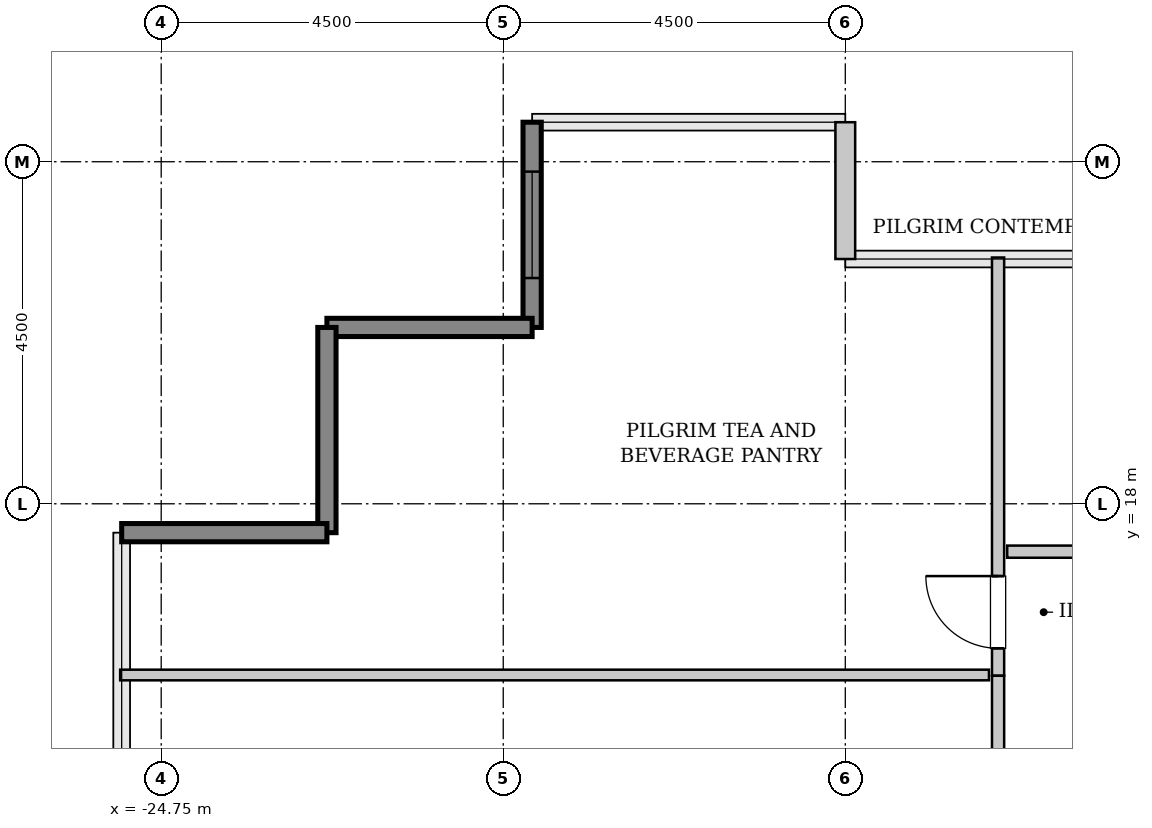
"""IFC4 building model, lengths in metres.
Left out: names, types, materials, properties, quantities, classifications, styles, units other than length and angle.
Written with IfcOpenShell. Run it as: python <this file> out.ifc"""

import sys

from ifc_helpers import new_model, si_unit, direction, frame, frame_2d, origin, place, context, subcontext, project, spatial, rectangle, extrude, source, transform, mapped, element, fill, save


model = new_model("IFC4")
c1 = context("Model", 3, precision=1e-05, world=origin(), true_north=direction((0.0, 1.0)))
c2 = subcontext(c1, "Body", "Model", "MODEL_VIEW")
j1 = project(units=[si_unit("LENGTHUNIT", "METRE"), si_unit("PLANEANGLEUNIT", "RADIAN")], contexts=[c1])
p1 = place(None, origin())
s1 = spatial("IfcSite", under=j1, at=p1, CompositionType="ELEMENT")
p2 = place(p1, origin())
s2 = spatial("IfcBuilding", under=s1, at=p2, CompositionType="ELEMENT")
p3 = place(p2, frame((0.0, 0.0, 233.2)))
s3 = spatial("IfcBuildingStorey", under=s2, at=p3, CompositionType="ELEMENT", Elevation=233.2)
m1 = source(origin(), c2, "Body", "SweptSolid", [
    extrude(rectangle(XDim=1.8, YDim=0.26, at=frame_2d((0.9, 0.0))), origin(), (0.0, 0.0, 1.0), 3.55),
])
p4 = place(p3, frame((-15.75, 21.22, 0.0), z_axis=(0.0, 0.0, 1.0), x_axis=(0.0, 1.0, 0.0)))
e1 = element("IfcWall", 1, at=p4, inside=s3, PredefinedType="SOLIDWALL", context=c2, shape_type="MappedRepresentation", body=[
    mapped(m1, transform((0.0, 0.0, 0.0), x_axis=(1.0, 0.0, 0.0), y_axis=(0.0, 1.0, 0.0), z_axis=(0.0, 0.0, 1.0), scale=1.0)),
])
m2 = source(origin(), c2, "Body", "SweptSolid", [
    extrude(rectangle(XDim=2.7, YDim=0.24, at=frame_2d((1.35, 0.0))), origin(), (0.0, 0.0, 1.0), 3.55),
])
p5 = place(p3, frame((-19.87, 23.02, 0.0), z_axis=(0.0, 0.0, 1.0), x_axis=(0.0, -1.0, 0.0)))
e2 = element("IfcWall", 2, at=p5, inside=s3, PredefinedType="SHEAR", context=c2, shape_type="MappedRepresentation", body=[
    mapped(m2, transform((0.0, 0.0, 0.0), x_axis=(1.0, 0.0, 0.0), y_axis=(0.0, 1.0, 0.0), z_axis=(0.0, 0.0, 1.0), scale=1.0)),
])
p6 = place(p5, frame((0.65, 0.0, 0.85)))
e3 = element("IfcOpeningElement", 3, at=p6, cuts=e2, PredefinedType="OPENING", context=c2, shape_type="SweptSolid", body=[
    extrude(rectangle(XDim=1.4, YDim=1.8, at=frame_2d((0.7, 0.9))), frame((0.0, 0.13, 0.0), z_axis=(0.0, -1.0, 0.0), x_axis=(1.0, 0.0, 0.0)), (0.0, 0.0, 1.0), 0.26),
])
for number, where, z_axis, x_axis in (
    (4, (-19.87, 20.32, 0.0), (0.0, 0.0, 1.0), (-1.0, 0.0, 0.0)),
    (5, (-22.57, 20.32, 0.0), (0.0, 0.0, 1.0), (0.0, -1.0, 0.0)),
    (6, (-22.57, 17.62, 0.0), (0.0, 0.0, 1.0), (-1.0, 0.0, 0.0)),
):
    element("IfcWall", number, at=place(p3, frame(where, z_axis=z_axis, x_axis=x_axis)), inside=s3, PredefinedType="SHEAR", context=c2, shape_type="MappedRepresentation", body=[
        mapped(m2, transform((0.0, 0.0, 0.0), x_axis=(1.0, 0.0, 0.0), y_axis=(0.0, 1.0, 0.0), z_axis=(0.0, 0.0, 1.0), scale=1.0)),
    ])
m3 = source(origin(), c2, "Body", "SweptSolid", [
    extrude(rectangle(XDim=5.502, YDim=0.16, at=frame_2d((2.751, 0.0))), origin(), (0.0, 0.0, 1.0), 3.535),
])
p7 = place(p3, frame((-13.74, 15.738, 0.0), z_axis=(0.0, 0.0, 1.0), x_axis=(0.0, 1.0, 0.0)))
e7 = element("IfcWall", 7, at=p7, inside=s3, PredefinedType="PARTITIONING", context=c2, shape_type="MappedRepresentation", body=[
    mapped(m3, transform((0.0, 0.0, 0.0), x_axis=(1.0, 0.0, 0.0), y_axis=(0.0, 1.0, 0.0), z_axis=(0.0, 0.0, 1.0), scale=1.0)),
])
p8 = place(p7, frame((0.361, 0.0, 0.0)))
e8 = element("IfcOpeningElement", 8, at=p8, cuts=e7, PredefinedType="OPENING", context=c2, shape_type="SweptSolid", body=[
    extrude(rectangle(XDim=0.95, YDim=2.1, at=frame_2d((0.475, 1.05))), frame((0.0, 0.09, 0.0), z_axis=(0.0, -1.0, 0.0), x_axis=(1.0, 0.0, 0.0)), (0.0, 0.0, 1.0), 0.18),
])
m4 = source(origin(), c2, "Body", "SweptSolid", [
    extrude(rectangle(XDim=11.43, YDim=0.14, at=frame_2d((5.715, 0.0))), origin(), (0.0, 0.0, 1.0), 3.535),
])
p9 = place(p3, frame((-25.29, 15.748, 0.0), z_axis=(0.0, 0.0, 1.0), x_axis=(1.0, 0.0, 0.0)))
e9 = element("IfcWall", 9, at=p9, inside=s3, PredefinedType="PARTITIONING", context=c2, shape_type="MappedRepresentation", body=[
    mapped(m4, transform((0.0, 0.0, 0.0), x_axis=(1.0, 0.0, 0.0), y_axis=(0.0, 1.0, 0.0), z_axis=(0.0, 0.0, 1.0), scale=1.0)),
])
m5 = source(origin(), c2, "Body", "SweptSolid", [
    extrude(rectangle(XDim=7.242, YDim=0.16, at=frame_2d((3.621, 0.0))), origin(), (0.0, 0.0, 1.0), 3.535),
])
p10 = place(p3, frame((-13.74, 8.495, 0.0), z_axis=(0.0, 0.0, 1.0), x_axis=(0.0, 1.0, 0.0)))
e10 = element("IfcWall", 10, at=p10, inside=s3, PredefinedType="PARTITIONING", context=c2, shape_type="MappedRepresentation", body=[
    mapped(m5, transform((0.0, 0.0, 0.0), x_axis=(1.0, 0.0, 0.0), y_axis=(0.0, 1.0, 0.0), z_axis=(0.0, 0.0, 1.0), scale=1.0)),
])
p11 = place(p10, frame((3.146, 0.0, 0.0)))
e11 = element("IfcOpeningElement", 11, at=p11, cuts=e10, PredefinedType="OPENING", context=c2, shape_type="SweptSolid", body=[
    extrude(rectangle(XDim=0.95, YDim=2.1, at=frame_2d((0.475, 1.05))), frame((0.0, 0.09, 0.0), z_axis=(0.0, -1.0, 0.0), x_axis=(1.0, 0.0, 0.0)), (0.0, 0.0, 1.0), 0.18),
])
m6 = source(origin(), c2, "Body", "SweptSolid", [
    extrude(rectangle(XDim=4.16, YDim=0.16, at=frame_2d((2.08, 0.0))), origin(), (0.0, 0.0, 1.0), 3.535),
])
p12 = place(p3, frame((-13.62, 17.37, 0.0), z_axis=(0.0, 0.0, 1.0), x_axis=(1.0, 0.0, 0.0)))
e12 = element("IfcWall", 12, at=p12, inside=s3, PredefinedType="PARTITIONING", context=c2, shape_type="MappedRepresentation", body=[
    mapped(m6, transform((0.0, 0.0, 0.0), x_axis=(1.0, 0.0, 0.0), y_axis=(0.0, 1.0, 0.0), z_axis=(0.0, 0.0, 1.0), scale=1.0)),
])
p13 = place(p12, frame((0.969, 0.0, 0.0)))
e13 = element("IfcOpeningElement", 13, at=p13, cuts=e12, PredefinedType="OPENING", context=c2, shape_type="SweptSolid", body=[
    extrude(rectangle(XDim=0.95, YDim=2.1, at=frame_2d((0.475, 1.05))), frame((0.0, 0.09, 0.0), z_axis=(0.0, -1.0, 0.0), x_axis=(1.0, 0.0, 0.0)), (0.0, 0.0, 1.0), 0.18),
])
m7 = source(origin(), c2, "Body", "SweptSolid", [
    extrude(rectangle(XDim=1.4, YDim=1.8, at=frame_2d((0.7, 0.9))), frame((0.0, 0.03, 0.0), z_axis=(0.0, -1.0, 0.0), x_axis=(1.0, 0.0, 0.0)), (0.0, 0.0, 1.0), 0.06),
])
p14 = place(p6, origin())
e14 = element("IfcWindow", 14, at=p14, inside=s3, PartitioningType="SINGLE_PANEL", PredefinedType="WINDOW", context=c2, shape_type="MappedRepresentation", body=[
    mapped(m7, transform((0.0, 0.0, 0.0), x_axis=(1.0, 0.0, 0.0), y_axis=(0.0, 1.0, 0.0), z_axis=(0.0, 0.0, 1.0), scale=1.0)),
])
fill(e3, e14)
m8 = source(origin(), c2, "Body", "SweptSolid", [
    extrude(rectangle(XDim=0.95, YDim=2.1, at=frame_2d((0.475, 1.05))), frame((0.0, 0.025, 0.0), z_axis=(0.0, -1.0, 0.0), x_axis=(1.0, 0.0, 0.0)), (0.0, 0.0, 1.0), 0.05),
])
p15 = place(p8, origin())
e15 = element("IfcDoor", 15, at=p15, inside=s3, OperationType="SINGLE_SWING_RIGHT", PredefinedType="DOOR", context=c2, shape_type="MappedRepresentation", body=[
    mapped(m8, transform((0.0, 0.0, 0.0), x_axis=(1.0, 0.0, 0.0), y_axis=(0.0, 1.0, 0.0), z_axis=(0.0, 0.0, 1.0), scale=1.0)),
])
fill(e8, e15)
save(model, sys.argv[1])
